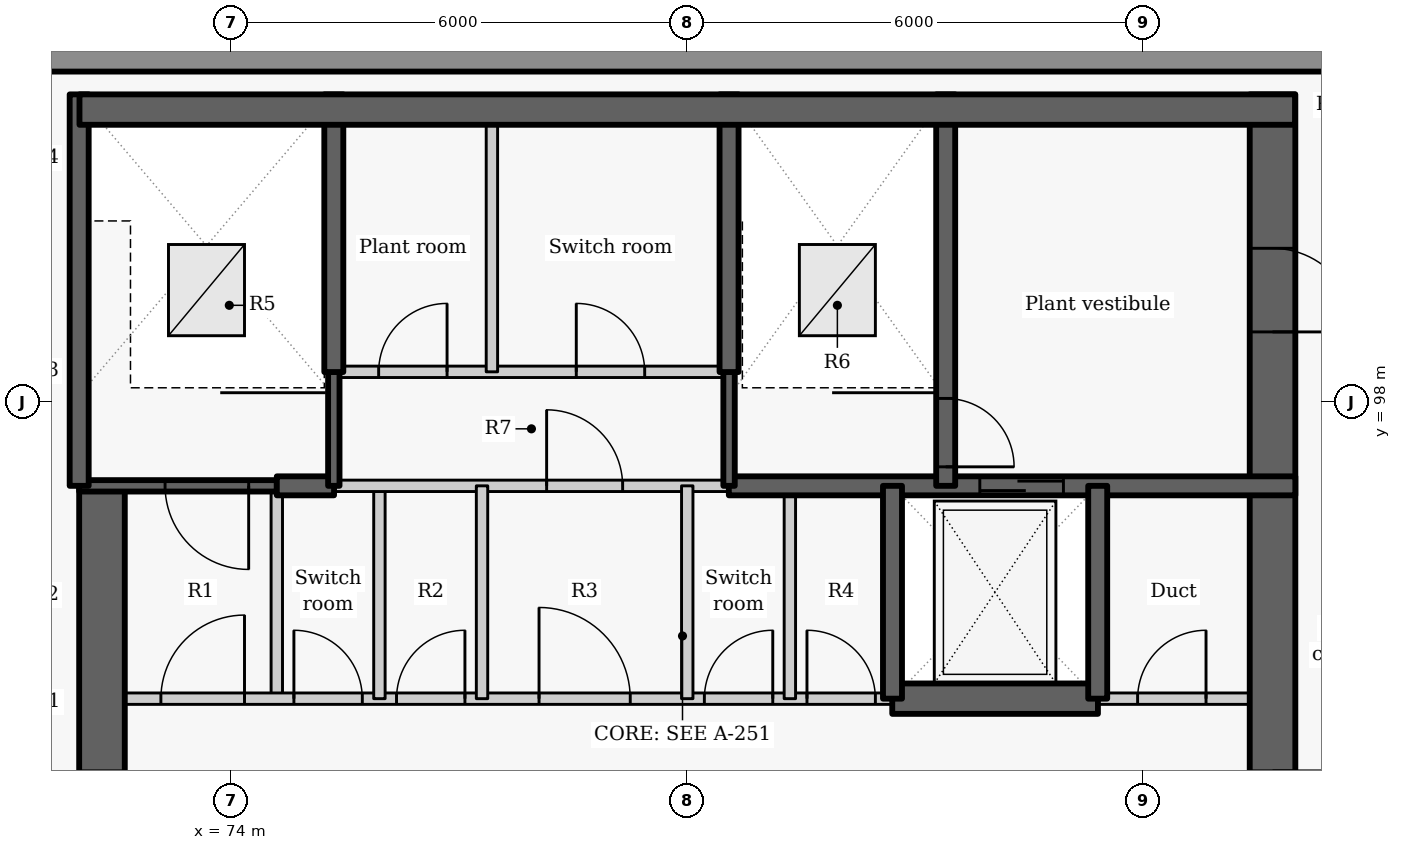
"""IFC4 building model, lengths in metres.
Left out: names, types, materials, properties, quantities, classifications, styles, units other than length and angle.
Written with IfcOpenShell. Run it as: python <this file> out.ifc"""

import sys

from ifc_helpers import new_model, si_unit, direction, frame, frame_2d, origin, origin_2d, place, context, subcontext, project, spatial, rectangle, extrude, element, fill, save


model = new_model("IFC4")
c1 = context("Model", 3, precision=1e-05, world=origin(), true_north=direction((0.0, 1.0)))
c2 = subcontext(c1, "Body", "Model", "MODEL_VIEW")
j1 = project(units=[si_unit("LENGTHUNIT", "METRE"), si_unit("PLANEANGLEUNIT", "RADIAN")], contexts=[c1])
p1 = place(None, origin())
s1 = spatial("IfcSite", under=j1, at=p1, CompositionType="ELEMENT")
p2 = place(p1, origin())
s2 = spatial("IfcBuilding", under=s1, at=p2, CompositionType="ELEMENT")
p3 = place(p2, frame((0.0, 0.0, 294.0)))
s3 = spatial("IfcBuildingStorey", under=s2, at=p3, CompositionType="ELEMENT", Elevation=294.0)
p4 = place(p3, frame((89.549, 102.5, 0.0), z_axis=(0.0, 0.0, 1.0), x_axis=(-1.0, 0.0, 0.0)))
e1 = element("IfcWall", 1, at=p4, inside=s3, PredefinedType="SOLIDWALL", context=c2, shape_type="SweptSolid", body=[
    extrude(rectangle(XDim=19.134, YDim=0.3, at=frame_2d((9.567, 0.0))), origin(), (0.0, 0.0, 1.0), 3.325),
])
p5 = place(p3, frame((74.6, 94.1, 0.0), z_axis=(0.0, 0.0, 1.0), x_axis=(0.0, 1.0, 0.0)))
e2 = element("IfcWall", 2, at=p5, inside=s3, PredefinedType="PARTITIONING", context=c2, shape_type="SweptSolid", body=[
    extrude(rectangle(XDim=2.8, YDim=0.15, at=frame_2d((1.4, 0.0))), origin(), (0.0, 0.0, 1.0), 3.325),
])
p6 = place(p3, frame((72.3, 87.8, -0.275), z_axis=(0.0, 0.0, 1.0), x_axis=(0.0, 1.0, 0.0)))
e3 = element("IfcWall", 3, at=p6, inside=s3, PredefinedType="SHEAR", context=c2, shape_type="SweptSolid", body=[
    extrude(rectangle(XDim=9.1, YDim=0.6, at=frame_2d((4.55, 0.0))), origin(), (0.0, 0.0, 1.0), 3.6),
])
p7 = place(p6, frame((3.85, 0.0, 0.275)))
e4 = element("IfcOpeningElement", 4, at=p7, cuts=e3, PredefinedType="OPENING", context=c2, shape_type="SweptSolid", body=[
    extrude(rectangle(XDim=1.5, YDim=2.1, at=frame_2d((0.75, 1.05))), frame((0.0, 0.31, 0.0), z_axis=(0.0, -1.0, 0.0), x_axis=(1.0, 0.0, 0.0)), (0.0, 0.0, 1.0), 0.62),
])
p8 = place(p3, frame((72.0, 94.1, 0.0), z_axis=(0.0, 0.0, 1.0), x_axis=(1.0, 0.0, 0.0)))
e5 = element("IfcWall", 5, at=p8, inside=s3, PredefinedType="PARTITIONING", context=c2, shape_type="SweptSolid", body=[
    extrude(rectangle(XDim=10.703, YDim=0.15, at=frame_2d((5.352, 0.0))), origin(), (0.0, 0.0, 1.0), 3.325),
])
p9 = place(p8, frame((1.075, 0.0, 0.0)))
e6 = element("IfcOpeningElement", 6, at=p9, cuts=e5, PredefinedType="OPENING", context=c2, shape_type="SweptSolid", body=[
    extrude(rectangle(XDim=1.1, YDim=2.1, at=frame_2d((0.55, 1.05))), frame((0.0, 0.085, 0.0), z_axis=(0.0, -1.0, 0.0), x_axis=(1.0, 0.0, 0.0)), (0.0, 0.0, 1.0), 0.17),
])
p10 = place(p8, frame((2.825, 0.0, 0.0)))
e7 = element("IfcOpeningElement", 7, at=p10, cuts=e5, PredefinedType="OPENING", context=c2, shape_type="SweptSolid", body=[
    extrude(rectangle(XDim=0.9, YDim=2.1, at=frame_2d((0.45, 1.05))), frame((0.0, 0.085, 0.0), z_axis=(0.0, -1.0, 0.0), x_axis=(1.0, 0.0, 0.0)), (0.0, 0.0, 1.0), 0.17),
])
p11 = place(p8, frame((4.175, 0.0, 0.0)))
e8 = element("IfcOpeningElement", 8, at=p11, cuts=e5, PredefinedType="OPENING", context=c2, shape_type="SweptSolid", body=[
    extrude(rectangle(XDim=0.9, YDim=2.1, at=frame_2d((0.45, 1.05))), frame((0.0, 0.085, 0.0), z_axis=(0.0, -1.0, 0.0), x_axis=(1.0, 0.0, 0.0)), (0.0, 0.0, 1.0), 0.17),
])
p12 = place(p8, frame((6.05, 0.0, 0.0)))
e9 = element("IfcOpeningElement", 9, at=p12, cuts=e5, PredefinedType="OPENING", context=c2, shape_type="SweptSolid", body=[
    extrude(rectangle(XDim=1.2, YDim=2.1, at=frame_2d((0.6, 1.05))), frame((0.0, 0.085, 0.0), z_axis=(0.0, -1.0, 0.0), x_axis=(1.0, 0.0, 0.0)), (0.0, 0.0, 1.0), 0.17),
])
p13 = place(p8, frame((8.225, 0.0, 0.0)))
e10 = element("IfcOpeningElement", 10, at=p13, cuts=e5, PredefinedType="OPENING", context=c2, shape_type="SweptSolid", body=[
    extrude(rectangle(XDim=0.9, YDim=2.1, at=frame_2d((0.45, 1.05))), frame((0.0, 0.085, 0.0), z_axis=(0.0, -1.0, 0.0), x_axis=(1.0, 0.0, 0.0)), (0.0, 0.0, 1.0), 0.17),
])
p14 = place(p8, frame((9.575, 0.0, 0.0)))
e11 = element("IfcOpeningElement", 11, at=p14, cuts=e5, PredefinedType="OPENING", context=c2, shape_type="SweptSolid", body=[
    extrude(rectangle(XDim=0.9, YDim=2.1, at=frame_2d((0.45, 1.05))), frame((0.0, 0.085, 0.0), z_axis=(0.0, -1.0, 0.0), x_axis=(1.0, 0.0, 0.0)), (0.0, 0.0, 1.0), 0.17),
])
p15 = place(p3, frame((85.397, 94.1, 0.0), z_axis=(0.0, 0.0, 1.0), x_axis=(1.0, 0.0, 0.0)))
e12 = element("IfcWall", 12, at=p15, inside=s3, PredefinedType="PARTITIONING", context=c2, shape_type="SweptSolid", body=[
    extrude(rectangle(XDim=2.603, YDim=0.15, at=frame_2d((1.302, 0.0))), origin(), (0.0, 0.0, 1.0), 3.325),
])
p16 = place(p15, frame((0.528, 0.0, 0.0)))
e13 = element("IfcOpeningElement", 13, at=p16, cuts=e12, PredefinedType="OPENING", context=c2, shape_type="SweptSolid", body=[
    extrude(rectangle(XDim=0.9, YDim=2.1, at=frame_2d((0.45, 1.05))), frame((0.0, 0.085, 0.0), z_axis=(0.0, -1.0, 0.0), x_axis=(1.0, 0.0, 0.0)), (0.0, 0.0, 1.0), 0.17),
])
p17 = place(p3, frame((82.697, 94.1, -0.275), z_axis=(0.0, 0.0, 1.0), x_axis=(1.0, 0.0, 0.0)))
e14 = element("IfcWall", 14, at=p17, inside=s3, PredefinedType="SHEAR", context=c2, shape_type="SweptSolid", body=[
    extrude(rectangle(XDim=2.706, YDim=0.4, at=frame_2d((1.353, 0.0))), origin(), (0.0, 0.0, 1.0), 3.6),
])
p18 = place(p3, frame((87.7, 102.05, -0.275), z_axis=(0.0, 0.0, 1.0), x_axis=(0.0, -1.0, 0.0)))
e15 = element("IfcWall", 15, at=p18, inside=s3, PredefinedType="SHEAR", context=c2, shape_type="SweptSolid", body=[
    extrude(rectangle(XDim=11.35, YDim=0.6, at=frame_2d((5.675, 0.0))), origin(), (0.0, 0.0, 1.0), 3.6),
])
p19 = place(p18, frame((8.9, 0.0, 0.275)))
e16 = element("IfcOpeningElement", 16, at=p19, cuts=e15, PredefinedType="OPENING", context=c2, shape_type="SweptSolid", body=[
    extrude(rectangle(XDim=1.5, YDim=2.1, at=frame_2d((0.75, 1.05))), frame((0.0, 0.31, 0.0), z_axis=(0.0, -1.0, 0.0), x_axis=(1.0, 0.0, 0.0)), (0.0, 0.0, 1.0), 0.62),
])
p20 = place(p18, frame((2.025, 0.0, 0.275)))
e17 = element("IfcOpeningElement", 17, at=p20, cuts=e15, PredefinedType="OPENING", context=c2, shape_type="SweptSolid", body=[
    extrude(rectangle(XDim=1.1, YDim=2.1, at=frame_2d((0.55, 1.05))), frame((0.0, 0.31, 0.0), z_axis=(0.0, -1.0, 0.0), x_axis=(1.0, 0.0, 0.0)), (0.0, 0.0, 1.0), 0.62),
])
p21 = place(p3, frame((74.6, 96.9, -0.275), z_axis=(0.0, 0.0, 1.0), x_axis=(-1.0, 0.0, 0.0)))
e18 = element("IfcWall", 18, at=p21, inside=s3, PredefinedType="SHEAR", context=c2, shape_type="SweptSolid", body=[
    extrude(rectangle(XDim=2.6, YDim=0.15, at=frame_2d((1.3, 0.0))), origin(), (0.0, 0.0, 1.0), 3.6),
])
p22 = place(p21, frame((0.37, 0.0, 0.275)))
e19 = element("IfcOpeningElement", 19, at=p22, cuts=e18, PredefinedType="OPENING", context=c2, shape_type="SweptSolid", body=[
    extrude(rectangle(XDim=1.1, YDim=2.1, at=frame_2d((0.55, 1.05))), frame((0.0, 0.085, 0.0), z_axis=(0.0, -1.0, 0.0), x_axis=(1.0, 0.0, 0.0)), (0.0, 0.0, 1.0), 0.17),
])
p23 = place(p3, frame((75.95, 94.1, 0.0), z_axis=(0.0, 0.0, 1.0), x_axis=(0.0, 1.0, 0.0)))
e20 = element("IfcWall", 20, at=p23, inside=s3, PredefinedType="PARTITIONING", context=c2, shape_type="SweptSolid", body=[
    extrude(rectangle(XDim=2.8, YDim=0.15, at=frame_2d((1.4, 0.0))), origin(), (0.0, 0.0, 1.0), 3.325),
])
p24 = place(p3, frame((74.6, 96.9, -0.275), z_axis=(0.0, 0.0, 1.0), x_axis=(1.0, 0.0, 0.0)))
e21 = element("IfcWall", 21, at=p24, inside=s3, PredefinedType="SHEAR", context=c2, shape_type="SweptSolid", body=[
    extrude(rectangle(XDim=0.753, YDim=0.25, at=frame_2d((0.376, 0.0))), origin(), (0.0, 0.0, 1.0), 3.6),
])
p25 = place(p3, frame((80.547, 96.9, -0.275), z_axis=(0.0, 0.0, 1.0), x_axis=(1.0, 0.0, 0.0)))
e22 = element("IfcWall", 22, at=p25, inside=s3, PredefinedType="SHEAR", context=c2, shape_type="SweptSolid", body=[
    extrude(rectangle(XDim=7.453, YDim=0.25, at=frame_2d((3.727, 0.0))), origin(), (0.0, 0.0, 1.0), 3.6),
])
p26 = place(p25, frame((3.302, 0.0, 0.275)))
e23 = element("IfcOpeningElement", 23, at=p26, cuts=e22, PredefinedType="OPENING", context=c2, shape_type="SweptSolid", body=[
    extrude(rectangle(XDim=1.1, YDim=2.1, at=frame_2d((0.55, 1.05))), frame((0.0, 0.135, 0.0), z_axis=(0.0, -1.0, 0.0), x_axis=(1.0, 0.0, 0.0)), (0.0, 0.0, 1.0), 0.27),
])
p27 = place(p3, frame((75.347, 96.9, 0.0), z_axis=(0.0, 0.0, 1.0), x_axis=(1.0, 0.0, 0.0)))
e24 = element("IfcWall", 24, at=p27, inside=s3, PredefinedType="PARTITIONING", context=c2, shape_type="SweptSolid", body=[
    extrude(rectangle(XDim=5.206, YDim=0.15, at=frame_2d((2.603, 0.0))), origin(), (0.0, 0.0, 1.0), 3.325),
])
p28 = place(p27, frame((2.803, 0.0, 0.0)))
e25 = element("IfcOpeningElement", 25, at=p28, cuts=e24, PredefinedType="OPENING", context=c2, shape_type="SweptSolid", body=[
    extrude(rectangle(XDim=1.0, YDim=2.1, at=frame_2d((0.5, 1.05))), frame((0.0, 0.085, 0.0), z_axis=(0.0, -1.0, 0.0), x_axis=(1.0, 0.0, 0.0)), (0.0, 0.0, 1.0), 0.17),
])
for number, where, z_axis, x_axis in (
    (26, (77.3, 94.1, 0.0), (0.0, 0.0, 1.0), (0.0, 1.0, 0.0)),
    (27, (80.0, 94.1, 0.0), (0.0, 0.0, 1.0), (0.0, 1.0, 0.0)),
    (28, (81.35, 94.1, 0.0), (0.0, 0.0, 1.0), (0.0, 1.0, 0.0)),
):
    element("IfcWall", number, at=place(p3, frame(where, z_axis=z_axis, x_axis=x_axis)), inside=s3, PredefinedType="PARTITIONING", context=c2, shape_type="SweptSolid", body=[
        extrude(rectangle(XDim=2.8, YDim=0.15, at=frame_2d((1.4, 0.0))), origin(), (0.0, 0.0, 1.0), 3.325),
    ])
for number, where, z_axis, x_axis in (
    (29, (82.7, 94.1, -0.275), (0.0, 0.0, 1.0), (0.0, 1.0, 0.0)),
    (30, (85.4, 94.1, -0.275), (0.0, 0.0, 1.0), (0.0, 1.0, 0.0)),
):
    element("IfcWall", number, at=place(p3, frame(where, z_axis=z_axis, x_axis=x_axis)), inside=s3, PredefinedType="SHEAR", context=c2, shape_type="SweptSolid", body=[
        extrude(rectangle(XDim=2.8, YDim=0.25, at=frame_2d((1.4, 0.0))), origin(), (0.0, 0.0, 1.0), 3.6),
    ])
p29 = place(p3, frame((75.35, 96.9, -0.275), z_axis=(0.0, 0.0, 1.0), x_axis=(0.0, 1.0, 0.0)))
e31 = element("IfcWall", 31, at=p29, inside=s3, PredefinedType="SHEAR", context=c2, shape_type="SweptSolid", body=[
    extrude(rectangle(XDim=1.503, YDim=0.15, at=frame_2d((0.751, 0.0))), origin(), (0.0, 0.0, 1.0), 3.6),
])
p30 = place(p3, frame((75.35, 98.397, -0.275), z_axis=(0.0, 0.0, 1.0), x_axis=(0.0, 1.0, 0.0)))
e32 = element("IfcWall", 32, at=p30, inside=s3, PredefinedType="SHEAR", context=c2, shape_type="SweptSolid", body=[
    extrude(rectangle(XDim=3.653, YDim=0.25, at=frame_2d((1.827, 0.0))), origin(), (0.0, 0.0, 1.0), 3.6),
])
p31 = place(p3, frame((72.0, 96.9, -0.275), z_axis=(0.0, 0.0, 1.0), x_axis=(0.0, 1.0, 0.0)))
e33 = element("IfcWall", 33, at=p31, inside=s3, PredefinedType="SHEAR", context=c2, shape_type="SweptSolid", body=[
    extrude(rectangle(XDim=5.15, YDim=0.25, at=frame_2d((2.575, 0.0))), origin(), (0.0, 0.0, 1.0), 3.6),
])
p32 = place(p3, frame((83.4, 102.05, -0.275), z_axis=(0.0, 0.0, 1.0), x_axis=(0.0, -1.0, 0.0)))
e34 = element("IfcWall", 34, at=p32, inside=s3, PredefinedType="SHEAR", context=c2, shape_type="SweptSolid", body=[
    extrude(rectangle(XDim=5.15, YDim=0.25, at=frame_2d((2.575, 0.0))), origin(), (0.0, 0.0, 1.0), 3.6),
])
p33 = place(p32, frame((4.0, 0.0, 0.275)))
e35 = element("IfcOpeningElement", 35, at=p33, cuts=e34, PredefinedType="OPENING", context=c2, shape_type="SweptSolid", body=[
    extrude(rectangle(XDim=0.9, YDim=2.1, at=frame_2d((0.45, 1.05))), frame((0.0, 0.135, 0.0), z_axis=(0.0, -1.0, 0.0), x_axis=(1.0, 0.0, 0.0)), (0.0, 0.0, 1.0), 0.27),
])
p34 = place(p3, frame((80.55, 96.9, -0.275), z_axis=(0.0, 0.0, 1.0), x_axis=(0.0, 1.0, 0.0)))
e36 = element("IfcWall", 36, at=p34, inside=s3, PredefinedType="SHEAR", context=c2, shape_type="SweptSolid", body=[
    extrude(rectangle(XDim=1.503, YDim=0.15, at=frame_2d((0.751, 0.0))), origin(), (0.0, 0.0, 1.0), 3.6),
])
p35 = place(p3, frame((80.55, 98.397, -0.275), z_axis=(0.0, 0.0, 1.0), x_axis=(0.0, 1.0, 0.0)))
e37 = element("IfcWall", 37, at=p35, inside=s3, PredefinedType="SHEAR", context=c2, shape_type="SweptSolid", body=[
    extrude(rectangle(XDim=3.653, YDim=0.25, at=frame_2d((1.827, 0.0))), origin(), (0.0, 0.0, 1.0), 3.6),
])
p36 = place(p3, frame((75.35, 98.4, 0.0), z_axis=(0.0, 0.0, 1.0), x_axis=(1.0, 0.0, 0.0)))
e38 = element("IfcWall", 38, at=p36, inside=s3, PredefinedType="PARTITIONING", context=c2, shape_type="SweptSolid", body=[
    extrude(rectangle(XDim=5.2, YDim=0.15, at=frame_2d((2.6, 0.0))), origin(), (0.0, 0.0, 1.0), 3.325),
])
p37 = place(p36, frame((0.59, 0.0, 0.0)))
e39 = element("IfcOpeningElement", 39, at=p37, cuts=e38, PredefinedType="OPENING", context=c2, shape_type="SweptSolid", body=[
    extrude(rectangle(XDim=0.9, YDim=2.1, at=frame_2d((0.45, 1.05))), frame((0.0, 0.085, 0.0), z_axis=(0.0, -1.0, 0.0), x_axis=(1.0, 0.0, 0.0)), (0.0, 0.0, 1.0), 0.17),
])
p38 = place(p36, frame((3.19, 0.0, 0.0)))
e40 = element("IfcOpeningElement", 40, at=p38, cuts=e38, PredefinedType="OPENING", context=c2, shape_type="SweptSolid", body=[
    extrude(rectangle(XDim=0.9, YDim=2.1, at=frame_2d((0.45, 1.05))), frame((0.0, 0.085, 0.0), z_axis=(0.0, -1.0, 0.0), x_axis=(1.0, 0.0, 0.0)), (0.0, 0.0, 1.0), 0.17),
])
p39 = place(p3, frame((77.43, 98.4, 0.0), z_axis=(0.0, 0.0, 1.0), x_axis=(0.0, 1.0, 0.0)))
e41 = element("IfcWall", 41, at=p39, inside=s3, PredefinedType="PARTITIONING", context=c2, shape_type="SweptSolid", body=[
    extrude(rectangle(XDim=3.65, YDim=0.15, at=frame_2d((1.825, 0.0))), origin(), (0.0, 0.0, 1.0), 3.325),
])
p40 = place(p3, frame((72.004, 101.85, -0.275), z_axis=(0.0, 0.0, 1.0), x_axis=(1.0, 0.0, 0.0)))
e42 = element("IfcWall", 42, at=p40, inside=s3, PredefinedType="SHEAR", context=c2, shape_type="SweptSolid", body=[
    extrude(rectangle(XDim=15.992, YDim=0.4, at=frame_2d((7.996, 0.0))), origin(), (0.0, 0.0, 1.0), 3.6),
])
p41 = place(p2, frame((0.0, 0.0, 297.6)))
p42 = place(p41, frame((0.0, 0.0, -0.275)))
p43 = place(p42, frame((73.675, 99.475, 0.0)))
p44 = place(p43, frame((0.0, 0.0, 0.225)))
e43 = element("IfcDoor", 43, at=p44, inside=s3, OperationType="SINGLE_SWING_LEFT", PredefinedType="TRAPDOOR", context=c2, shape_type="SweptSolid", body=[
    extrude(rectangle(XDim=1.0, YDim=1.2, at=origin_2d()), origin(), (0.0, 0.0, 1.0), 0.05),
])
p45 = place(p42, frame((81.975, 99.475, 0.0)))
p46 = place(p45, frame((0.0, 0.0, 0.225)))
e44 = element("IfcDoor", 44, at=p46, inside=s3, OperationType="SINGLE_SWING_LEFT", PredefinedType="TRAPDOOR", context=c2, shape_type="SweptSolid", body=[
    extrude(rectangle(XDim=1.0, YDim=1.2, at=origin_2d()), origin(), (0.0, 0.0, 1.0), 0.05),
])
p47 = place(p9, origin())
e45 = element("IfcDoor", 45, at=p47, inside=s3, OperationType="SINGLE_SWING_RIGHT", PredefinedType="DOOR", context=c2, shape_type="SweptSolid", body=[
    extrude(rectangle(XDim=1.1, YDim=2.1, at=frame_2d((0.55, 1.05))), frame((0.0, 0.025, 0.0), z_axis=(0.0, -1.0, 0.0), x_axis=(1.0, 0.0, 0.0)), (0.0, 0.0, 1.0), 0.05),
])
fill(e6, e45)
p48 = place(p10, origin())
e46 = element("IfcDoor", 46, at=p48, inside=s3, OperationType="SINGLE_SWING_LEFT", PredefinedType="DOOR", context=c2, shape_type="SweptSolid", body=[
    extrude(rectangle(XDim=0.9, YDim=2.1, at=frame_2d((0.45, 1.05))), frame((0.0, 0.025, 0.0), z_axis=(0.0, -1.0, 0.0), x_axis=(1.0, 0.0, 0.0)), (0.0, 0.0, 1.0), 0.05),
])
fill(e7, e46)
p49 = place(p11, origin())
e47 = element("IfcDoor", 47, at=p49, inside=s3, OperationType="SINGLE_SWING_RIGHT", PredefinedType="DOOR", context=c2, shape_type="SweptSolid", body=[
    extrude(rectangle(XDim=0.9, YDim=2.1, at=frame_2d((0.45, 1.05))), frame((0.0, 0.025, 0.0), z_axis=(0.0, -1.0, 0.0), x_axis=(1.0, 0.0, 0.0)), (0.0, 0.0, 1.0), 0.05),
])
fill(e8, e47)
p50 = place(p12, origin())
e48 = element("IfcDoor", 48, at=p50, inside=s3, OperationType="DOUBLE_DOOR_SINGLE_SWING", PredefinedType="DOOR", context=c2, shape_type="SweptSolid", body=[
    extrude(rectangle(XDim=1.2, YDim=2.1, at=frame_2d((0.6, 1.05))), frame((0.0, 0.025, 0.0), z_axis=(0.0, -1.0, 0.0), x_axis=(1.0, 0.0, 0.0)), (0.0, 0.0, 1.0), 0.05),
])
fill(e9, e48)
p51 = place(p13, origin())
e49 = element("IfcDoor", 49, at=p51, inside=s3, OperationType="SINGLE_SWING_RIGHT", PredefinedType="DOOR", context=c2, shape_type="SweptSolid", body=[
    extrude(rectangle(XDim=0.9, YDim=2.1, at=frame_2d((0.45, 1.05))), frame((0.0, 0.025, 0.0), z_axis=(0.0, -1.0, 0.0), x_axis=(1.0, 0.0, 0.0)), (0.0, 0.0, 1.0), 0.05),
])
fill(e10, e49)
p52 = place(p14, origin())
e50 = element("IfcDoor", 50, at=p52, inside=s3, OperationType="SINGLE_SWING_LEFT", PredefinedType="DOOR", context=c2, shape_type="SweptSolid", body=[
    extrude(rectangle(XDim=0.9, YDim=2.1, at=frame_2d((0.45, 1.05))), frame((0.0, 0.025, 0.0), z_axis=(0.0, -1.0, 0.0), x_axis=(1.0, 0.0, 0.0)), (0.0, 0.0, 1.0), 0.05),
])
fill(e11, e50)
p53 = place(p26, origin())
e51 = element("IfcDoor", 51, at=p53, inside=s3, OperationType="SLIDING_TO_LEFT", PredefinedType="DOOR", context=c2, shape_type="SweptSolid", body=[
    extrude(rectangle(XDim=1.1, YDim=2.1, at=frame_2d((0.55, 1.05))), frame((0.0, 0.025, 0.0), z_axis=(0.0, -1.0, 0.0), x_axis=(1.0, 0.0, 0.0)), (0.0, 0.0, 1.0), 0.05),
])
fill(e23, e51)
p54 = place(p16, origin())
e52 = element("IfcDoor", 52, at=p54, inside=s3, OperationType="SINGLE_SWING_RIGHT", PredefinedType="DOOR", context=c2, shape_type="SweptSolid", body=[
    extrude(rectangle(XDim=0.9, YDim=2.1, at=frame_2d((0.45, 1.05))), frame((0.0, 0.025, 0.0), z_axis=(0.0, -1.0, 0.0), x_axis=(1.0, 0.0, 0.0)), (0.0, 0.0, 1.0), 0.05),
])
fill(e13, e52)
p55 = place(p28, origin())
e53 = element("IfcDoor", 53, at=p55, inside=s3, OperationType="SINGLE_SWING_LEFT", PredefinedType="DOOR", context=c2, shape_type="SweptSolid", body=[
    extrude(rectangle(XDim=1.0, YDim=2.1, at=frame_2d((0.5, 1.05))), frame((0.0, 0.025, 0.0), z_axis=(0.0, -1.0, 0.0), x_axis=(1.0, 0.0, 0.0)), (0.0, 0.0, 1.0), 0.05),
])
fill(e25, e53)
p56 = place(p37, origin())
e54 = element("IfcDoor", 54, at=p56, inside=s3, OperationType="SINGLE_SWING_RIGHT", PredefinedType="DOOR", context=c2, shape_type="SweptSolid", body=[
    extrude(rectangle(XDim=0.9, YDim=2.1, at=frame_2d((0.45, 1.05))), frame((0.0, 0.025, 0.0), z_axis=(0.0, -1.0, 0.0), x_axis=(1.0, 0.0, 0.0)), (0.0, 0.0, 1.0), 0.05),
])
fill(e39, e54)
p57 = place(p38, origin())
e55 = element("IfcDoor", 55, at=p57, inside=s3, OperationType="SINGLE_SWING_LEFT", PredefinedType="DOOR", context=c2, shape_type="SweptSolid", body=[
    extrude(rectangle(XDim=0.9, YDim=2.1, at=frame_2d((0.45, 1.05))), frame((0.0, 0.025, 0.0), z_axis=(0.0, -1.0, 0.0), x_axis=(1.0, 0.0, 0.0)), (0.0, 0.0, 1.0), 0.05),
])
fill(e40, e55)
p58 = place(p22, origin())
e56 = element("IfcDoor", 56, at=p58, inside=s3, OperationType="SINGLE_SWING_LEFT", PredefinedType="DOOR", context=c2, shape_type="SweptSolid", body=[
    extrude(rectangle(XDim=1.1, YDim=2.1, at=frame_2d((0.55, 1.05))), frame((0.0, 0.025, 0.0), z_axis=(0.0, -1.0, 0.0), x_axis=(1.0, 0.0, 0.0)), (0.0, 0.0, 1.0), 0.05),
])
fill(e19, e56)
p59 = place(p33, origin())
e57 = element("IfcDoor", 57, at=p59, inside=s3, OperationType="SINGLE_SWING_RIGHT", PredefinedType="DOOR", context=c2, shape_type="SweptSolid", body=[
    extrude(rectangle(XDim=0.9, YDim=2.1, at=frame_2d((0.45, 1.05))), frame((0.0, 0.025, 0.0), z_axis=(0.0, -1.0, 0.0), x_axis=(1.0, 0.0, 0.0)), (0.0, 0.0, 1.0), 0.05),
])
fill(e35, e57)
p60 = place(p19, origin())
e58 = element("IfcDoor", 58, at=p60, inside=s3, OperationType="DOUBLE_DOOR_SINGLE_SWING", PredefinedType="DOOR", context=c2, shape_type="SweptSolid", body=[
    extrude(rectangle(XDim=1.5, YDim=2.1, at=frame_2d((0.75, 1.05))), frame((0.0, 0.025, 0.0), z_axis=(0.0, -1.0, 0.0), x_axis=(1.0, 0.0, 0.0)), (0.0, 0.0, 1.0), 0.05),
])
fill(e16, e58)
p61 = place(p7, origin())
e59 = element("IfcDoor", 59, at=p61, inside=s3, OperationType="DOUBLE_DOOR_SINGLE_SWING", PredefinedType="DOOR", context=c2, shape_type="SweptSolid", body=[
    extrude(rectangle(XDim=1.5, YDim=2.1, at=frame_2d((0.75, 1.05))), frame((0.0, 0.025, 0.0), z_axis=(0.0, -1.0, 0.0), x_axis=(1.0, 0.0, 0.0)), (0.0, 0.0, 1.0), 0.05),
])
fill(e4, e59)
p62 = place(p20, origin())
e60 = element("IfcDoor", 60, at=p62, inside=s3, OperationType="SINGLE_SWING_RIGHT", PredefinedType="DOOR", context=c2, shape_type="SweptSolid", body=[
    extrude(rectangle(XDim=1.1, YDim=2.1, at=frame_2d((0.55, 1.05))), frame((0.0, 0.025, 0.0), z_axis=(0.0, -1.0, 0.0), x_axis=(1.0, 0.0, 0.0)), (0.0, 0.0, 1.0), 0.05),
])
fill(e17, e60)
save(model, sys.argv[1])
